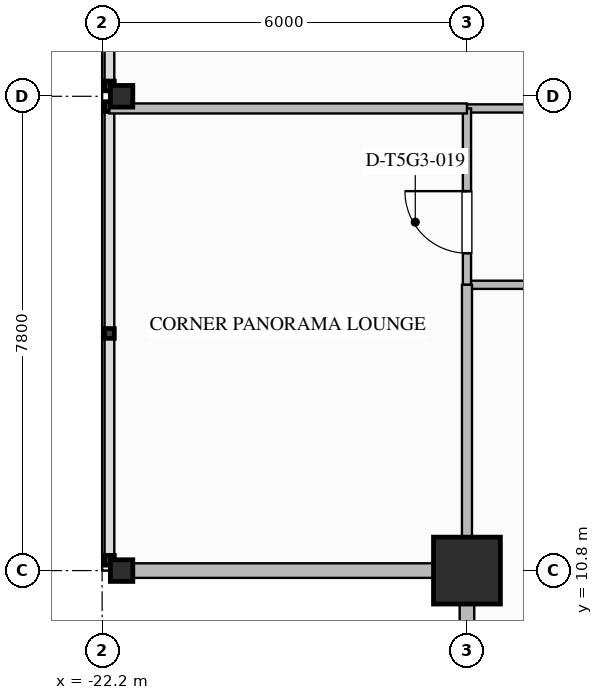
"""IFC4 building model, lengths in metres.
Left out: names, types, materials, properties, quantities, classifications, styles, units other than length and angle.
Written with IfcOpenShell. Run it as: python <this file> out.ifc"""

import sys

from ifc_helpers import new_model, si_unit, direction, frame, frame_2d, origin, origin_2d, place, context, subcontext, project, spatial, rectangle, i_section, extrude, element, fill, save


model = new_model("IFC4")
c1 = context("Model", 3, precision=1e-05, world=origin(), true_north=direction((0.0, 1.0)))
c2 = subcontext(c1, "Body", "Model", "MODEL_VIEW")
j1 = project(units=[si_unit("LENGTHUNIT", "METRE"), si_unit("PLANEANGLEUNIT", "RADIAN")], contexts=[c1])
p1 = place(None, origin())
s1 = spatial("IfcSite", under=j1, at=p1, CompositionType="ELEMENT")
p2 = place(p1, origin())
s2 = spatial("IfcBuilding", under=s1, at=p2, CompositionType="ELEMENT")
p3 = place(p2, frame((0.0, 0.0, 286.9)))
s3 = spatial("IfcBuildingStorey", under=s2, at=p3, CompositionType="ELEMENT", Elevation=286.9)
p4 = place(p3, frame((-16.2, 10.8, 0.0), z_axis=(0.0, 0.0, 1.0), x_axis=(1.0, 0.0, 0.0)))
e1 = element("IfcColumn", 1, at=p4, inside=s3, PredefinedType="COLUMN", context=c2, shape_type="SweptSolid", body=[
    extrude(rectangle(XDim=1.1, YDim=1.1, at=origin_2d()), origin(), (0.0, 0.0, 1.0), 3.65),
])
for number, where, z_axis, x_axis in (
    (2, (-21.88, 10.8, 0.0), (0.0, 0.0, 1.0), (1.0, 0.0, 0.0)),
    (3, (-21.88, 18.6, 0.0), (0.0, 0.0, 1.0), (1.0, 0.0, 0.0)),
):
    element("IfcColumn", number, at=place(p3, frame(where, z_axis=z_axis, x_axis=x_axis)), inside=s3, PredefinedType="COLUMN", context=c2, shape_type="SweptSolid", body=[
        extrude(i_section(OverallWidth=0.369, OverallDepth=0.356, WebThickness=0.011, FlangeThickness=0.018, FilletRadius=0.025, at=origin_2d()), origin(), (0.0, 0.0, 1.0), 3.647),
    ])
for number, where, z_axis, x_axis in (
    (4, (-16.2, 4.92, 0.0), (0.0, 0.0, 1.0), (0.0, 1.0, 0.0)),
    (5, (-16.2, 10.8, 0.0), (0.0, 0.0, 1.0), (-1.0, 0.0, 0.0)),
):
    element("IfcWall", number, at=place(p3, frame(where, z_axis=z_axis, x_axis=x_axis)), inside=s3, PredefinedType="STANDARD", context=c2, shape_type="SweptSolid", body=[
        extrude(rectangle(XDim=5.88, YDim=0.24, at=frame_2d((2.94, 0.0))), origin(), (0.0, 0.0, 1.0), 2.779),
    ])
p5 = place(p3, frame((-16.2, 15.5, 0.0), z_axis=(0.0, 0.0, 1.0), x_axis=(1.0, 0.0, 0.0)))
e6 = element("IfcWall", 6, at=p5, inside=s3, PredefinedType="PARTITIONING", context=c2, shape_type="SweptSolid", body=[
    extrude(rectangle(XDim=38.28, YDim=0.135, at=frame_2d((19.14, 0.0))), origin(), (0.0, 0.0, 1.0), 3.39),
])
p6 = place(p5, frame((33.355, 0.0, 0.0)))
e7 = element("IfcOpeningElement", 7, at=p6, cuts=e6, PredefinedType="OPENING", context=c2, shape_type="SweptSolid", body=[
    extrude(rectangle(XDim=1.26, YDim=2.2, at=frame_2d((0.63, 1.1))), frame((0.0, 0.077, 0.0), z_axis=(0.0, -1.0, 0.0), x_axis=(1.0, 0.0, 0.0)), (0.0, 0.0, 1.0), 0.155),
])
p7 = place(p5, frame((2.92, 0.0, 0.0)))
e8 = element("IfcOpeningElement", 8, at=p7, cuts=e6, PredefinedType="OPENING", context=c2, shape_type="SweptSolid", body=[
    extrude(rectangle(XDim=1.26, YDim=2.2, at=frame_2d((0.63, 1.1))), frame((0.0, 0.077, 0.0), z_axis=(0.0, -1.0, 0.0), x_axis=(1.0, 0.0, 0.0)), (0.0, 0.0, 1.0), 0.155),
])
p8 = place(p5, frame((11.178, 0.0, 0.0)))
e9 = element("IfcOpeningElement", 9, at=p8, cuts=e6, PredefinedType="OPENING", context=c2, shape_type="SweptSolid", body=[
    extrude(rectangle(XDim=1.26, YDim=2.2, at=frame_2d((0.63, 1.1))), frame((0.0, 0.077, 0.0), z_axis=(0.0, -1.0, 0.0), x_axis=(1.0, 0.0, 0.0)), (0.0, 0.0, 1.0), 0.155),
])
p9 = place(p5, frame((19.12, 0.0, 0.0)))
e10 = element("IfcOpeningElement", 10, at=p9, cuts=e6, PredefinedType="OPENING", context=c2, shape_type="SweptSolid", body=[
    extrude(rectangle(XDim=1.26, YDim=2.2, at=frame_2d((0.63, 1.1))), frame((0.0, 0.077, 0.0), z_axis=(0.0, -1.0, 0.0), x_axis=(1.0, 0.0, 0.0)), (0.0, 0.0, 1.0), 0.155),
])
p10 = place(p5, frame((27.061, 0.0, 0.0)))
e11 = element("IfcOpeningElement", 11, at=p10, cuts=e6, PredefinedType="OPENING", context=c2, shape_type="SweptSolid", body=[
    extrude(rectangle(XDim=1.26, YDim=2.2, at=frame_2d((0.63, 1.1))), frame((0.0, 0.077, 0.0), z_axis=(0.0, -1.0, 0.0), x_axis=(1.0, 0.0, 0.0)), (0.0, 0.0, 1.0), 0.155),
])
p11 = place(p3, frame((-16.2, 18.4, 0.0), z_axis=(0.0, 0.0, 1.0), x_axis=(1.0, 0.0, 0.0)))
e12 = element("IfcWall", 12, at=p11, inside=s3, PredefinedType="PARTITIONING", context=c2, shape_type="SweptSolid", body=[
    extrude(rectangle(XDim=7.6, YDim=0.135, at=frame_2d((3.8, 0.0))), origin(), (0.0, 0.0, 1.0), 2.768),
])
p12 = place(p11, frame((2.155, 0.0, 0.0)))
e13 = element("IfcOpeningElement", 13, at=p12, cuts=e12, PredefinedType="OPENING", context=c2, shape_type="SweptSolid", body=[
    extrude(rectangle(XDim=1.26, YDim=2.2, at=frame_2d((0.63, 1.1))), frame((0.0, 0.077, 0.0), z_axis=(0.0, -1.0, 0.0), x_axis=(1.0, 0.0, 0.0)), (0.0, 0.0, 1.0), 0.155),
])
p13 = place(p3, frame((-16.2, 15.5, 0.0), z_axis=(0.0, 0.0, 1.0), x_axis=(0.0, 1.0, 0.0)))
e14 = element("IfcWall", 14, at=p13, inside=s3, PredefinedType="PARTITIONING", context=c2, shape_type="SweptSolid", body=[
    extrude(rectangle(XDim=2.9, YDim=0.135, at=frame_2d((1.45, 0.0))), origin(), (0.0, 0.0, 1.0), 2.764),
])
p14 = place(p13, frame((0.52, 0.0, 0.0)))
e15 = element("IfcOpeningElement", 15, at=p14, cuts=e14, PredefinedType="OPENING", context=c2, shape_type="SweptSolid", body=[
    extrude(rectangle(XDim=1.02, YDim=2.15, at=frame_2d((0.51, 1.075))), frame((0.0, 0.077, 0.0), z_axis=(0.0, -1.0, 0.0), x_axis=(1.0, 0.0, 0.0)), (0.0, 0.0, 1.0), 0.155),
])
p15 = place(p3, frame((-16.2, 10.92, 0.0), z_axis=(0.0, 0.0, 1.0), x_axis=(0.0, 1.0, 0.0)))
e16 = element("IfcWall", 16, at=p15, inside=s3, PredefinedType="PARTITIONING", context=c2, shape_type="SweptSolid", body=[
    extrude(rectangle(XDim=4.58, YDim=0.165, at=frame_2d((2.29, 0.0))), origin(), (0.0, 0.0, 1.0), 2.764),
])
p16 = place(p3, frame((-22.08, 18.4, 0.0), z_axis=(0.0, 0.0, 1.0), x_axis=(1.0, 0.0, 0.0)))
e17 = element("IfcWall", 17, at=p16, inside=s3, PredefinedType="PARTITIONING", context=c2, shape_type="SweptSolid", body=[
    extrude(rectangle(XDim=5.88, YDim=0.165, at=frame_2d((2.94, 0.0))), origin(), (0.0, 0.0, 1.0), 2.764),
])
p17 = place(p14, origin())
e18 = element("IfcDoor", 18, at=p17, inside=s3, OperationType="SINGLE_SWING_RIGHT", PredefinedType="DOOR", context=c2, shape_type="SweptSolid", body=[
    extrude(rectangle(XDim=1.02, YDim=2.15, at=frame_2d((0.51, 1.075))), frame((0.0, 0.025, 0.0), z_axis=(0.0, -1.0, 0.0), x_axis=(1.0, 0.0, 0.0)), (0.0, 0.0, 1.0), 0.05),
])
fill(e15, e18)
save(model, sys.argv[1])
